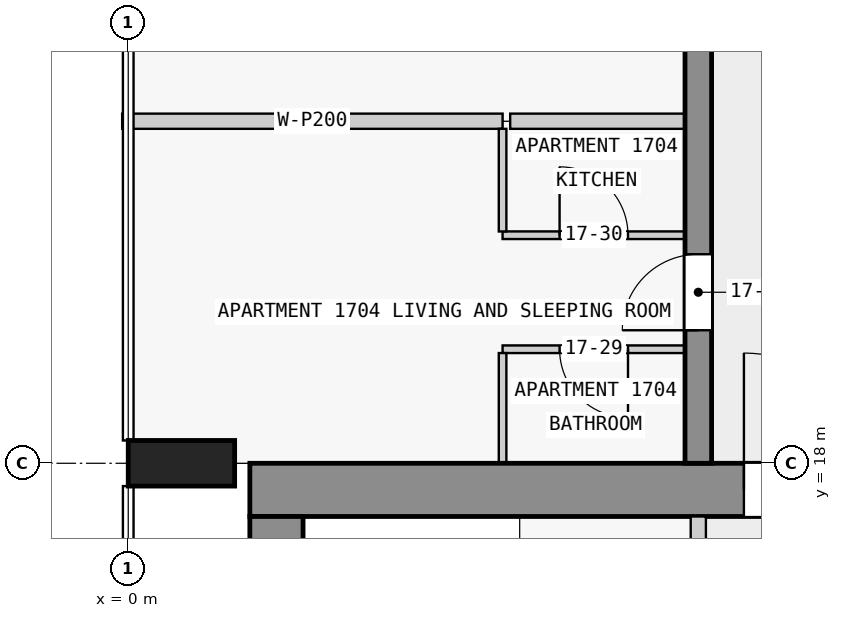
"""IFC4 building model, lengths in metres.
Left out: names, types, materials, properties, quantities, classifications, styles, units other than length and angle.
Written with IfcOpenShell. Run it as: python <this file> out.ifc"""

import sys

from ifc_helpers import new_model, si_unit, direction, frame, frame_2d, origin, origin_2d, place, context, subcontext, project, spatial, rectangle, extrude, element, fill, save


model = new_model("IFC4")
c1 = context("Model", 3, precision=1e-05, world=origin(), true_north=direction((0.0, 1.0)))
c2 = subcontext(c1, "Body", "Model", "MODEL_VIEW")
j1 = project(units=[si_unit("LENGTHUNIT", "METRE"), si_unit("PLANEANGLEUNIT", "RADIAN")], contexts=[c1])
p1 = place(None, origin())
s1 = spatial("IfcSite", under=j1, at=p1, CompositionType="ELEMENT")
p2 = place(p1, origin())
s2 = spatial("IfcBuilding", under=s1, at=p2, CompositionType="ELEMENT")
p3 = place(p2, frame((0.0, 0.0, 68.8)))
s3 = spatial("IfcBuildingStorey", under=s2, at=p3, CompositionType="ELEMENT", Elevation=68.8)
p4 = place(p3, frame((0.7, 18.0, 0.0), z_axis=(0.0, 0.0, 1.0), x_axis=(0.0, 1.0, 0.0)))
e1 = element("IfcColumn", 1, at=p4, inside=s3, PredefinedType="COLUMN", context=c2, shape_type="SweptSolid", body=[
    extrude(rectangle(XDim=0.6, YDim=1.4, at=origin_2d()), origin(), (0.0, 0.0, 1.0), 3.5),
])
p5 = place(p3, frame((1.6, 17.65, 0.0), z_axis=(0.0, 0.0, 1.0), x_axis=(1.0, 0.0, 0.0)))
e2 = element("IfcWall", 2, at=p5, inside=s3, PredefinedType="SHEAR", context=c2, shape_type="SweptSolid", body=[
    extrude(rectangle(XDim=20.9, YDim=0.7, at=frame_2d((10.45, 0.0))), origin(), (0.0, 0.0, 1.0), 3.2),
])
p6 = place(p5, frame((6.5, 0.0, 0.0)))
e3 = element("IfcOpeningElement", 3, at=p6, cuts=e2, PredefinedType="OPENING", context=c2, shape_type="SweptSolid", body=[
    extrude(rectangle(XDim=1.8, YDim=2.1, at=frame_2d((0.9, 1.05))), frame((0.0, 0.36, 0.0), z_axis=(0.0, -1.0, 0.0), x_axis=(1.0, 0.0, 0.0)), (0.0, 0.0, 1.0), 0.72),
])
p7 = place(p3, frame((1.95, 2.5, 0.0), z_axis=(0.0, 0.0, 1.0), x_axis=(0.0, 1.0, 0.0)))
e4 = element("IfcWall", 4, at=p7, inside=s3, PredefinedType="SHEAR", context=c2, shape_type="SweptSolid", body=[
    extrude(rectangle(XDim=14.8, YDim=0.7, at=frame_2d((7.4, 0.0))), origin(), (0.0, 0.0, 1.0), 3.2),
])
p8 = place(p3, frame((7.5, 18.0, 0.0), z_axis=(0.0, 0.0, 1.0), x_axis=(0.0, 1.0, 0.0)))
e5 = element("IfcWall", 5, at=p8, inside=s3, PredefinedType="SHEAR", context=c2, shape_type="SweptSolid", body=[
    extrude(rectangle(XDim=27.0, YDim=0.35, at=frame_2d((13.5, 0.0))), origin(), (0.0, 0.0, 1.0), 3.2),
])
p9 = place(p8, frame((1.75, 0.0, 0.0)))
e6 = element("IfcOpeningElement", 6, at=p9, cuts=e5, PredefinedType="OPENING", context=c2, shape_type="SweptSolid", body=[
    extrude(rectangle(XDim=1.0, YDim=2.1, at=frame_2d((0.5, 1.05))), frame((0.0, 0.185, 0.0), z_axis=(0.0, -1.0, 0.0), x_axis=(1.0, 0.0, 0.0)), (0.0, 0.0, 1.0), 0.37),
])
p10 = place(p8, frame((6.25, 0.0, 0.0)))
e7 = element("IfcOpeningElement", 7, at=p10, cuts=e5, PredefinedType="OPENING", context=c2, shape_type="SweptSolid", body=[
    extrude(rectangle(XDim=1.0, YDim=2.1, at=frame_2d((0.5, 1.05))), frame((0.0, 0.185, 0.0), z_axis=(0.0, -1.0, 0.0), x_axis=(1.0, 0.0, 0.0)), (0.0, 0.0, 1.0), 0.37),
])
p11 = place(p8, frame((10.75, 0.0, 0.0)))
e8 = element("IfcOpeningElement", 8, at=p11, cuts=e5, PredefinedType="OPENING", context=c2, shape_type="SweptSolid", body=[
    extrude(rectangle(XDim=1.0, YDim=2.1, at=frame_2d((0.5, 1.05))), frame((0.0, 0.185, 0.0), z_axis=(0.0, -1.0, 0.0), x_axis=(1.0, 0.0, 0.0)), (0.0, 0.0, 1.0), 0.37),
])
p12 = place(p8, frame((17.55, 0.0, 0.0)))
e9 = element("IfcOpeningElement", 9, at=p12, cuts=e5, PredefinedType="OPENING", context=c2, shape_type="SweptSolid", body=[
    extrude(rectangle(XDim=1.0, YDim=2.1, at=frame_2d((0.5, 1.05))), frame((0.0, 0.185, 0.0), z_axis=(0.0, -1.0, 0.0), x_axis=(1.0, 0.0, 0.0)), (0.0, 0.0, 1.0), 0.37),
])
p13 = place(p8, frame((23.25, 0.0, 0.0)))
e10 = element("IfcOpeningElement", 10, at=p13, cuts=e5, PredefinedType="OPENING", context=c2, shape_type="SweptSolid", body=[
    extrude(rectangle(XDim=0.9, YDim=2.1, at=frame_2d((0.45, 1.05))), frame((0.0, 0.185, 0.0), z_axis=(0.0, -1.0, 0.0), x_axis=(1.0, 0.0, 0.0)), (0.0, 0.0, 1.0), 0.37),
])
p14 = place(p8, frame((25.45, 0.0, 0.0)))
e11 = element("IfcOpeningElement", 11, at=p14, cuts=e5, PredefinedType="OPENING", context=c2, shape_type="SweptSolid", body=[
    extrude(rectangle(XDim=1.0, YDim=2.1, at=frame_2d((0.5, 1.05))), frame((0.0, 0.185, 0.0), z_axis=(0.0, -1.0, 0.0), x_axis=(1.0, 0.0, 0.0)), (0.0, 0.0, 1.0), 0.37),
])
p15 = place(p3, frame((7.5, 10.1, 0.0), z_axis=(0.0, 0.0, 1.0), x_axis=(0.0, 1.0, 0.0)))
e12 = element("IfcWall", 12, at=p15, inside=s3, PredefinedType="PARTITIONING", context=c2, shape_type="SweptSolid", body=[
    extrude(rectangle(XDim=7.2, YDim=0.2, at=frame_2d((3.6, 0.0))), origin(), (0.0, 0.0, 1.0), 3.2),
])
p16 = place(p15, frame((0.75, 0.0, 0.0)))
e13 = element("IfcOpeningElement", 13, at=p16, cuts=e12, PredefinedType="OPENING", context=c2, shape_type="SweptSolid", body=[
    extrude(rectangle(XDim=0.9, YDim=2.1, at=frame_2d((0.45, 1.05))), frame((0.0, 0.11, 0.0), z_axis=(0.0, -1.0, 0.0), x_axis=(1.0, 0.0, 0.0)), (0.0, 0.0, 1.0), 0.22),
])
p17 = place(p15, frame((4.35, 0.0, 0.0)))
e14 = element("IfcOpeningElement", 14, at=p17, cuts=e12, PredefinedType="OPENING", context=c2, shape_type="SweptSolid", body=[
    extrude(rectangle(XDim=0.9, YDim=2.1, at=frame_2d((0.45, 1.05))), frame((0.0, 0.11, 0.0), z_axis=(0.0, -1.0, 0.0), x_axis=(1.0, 0.0, 0.0)), (0.0, 0.0, 1.0), 0.22),
])
p18 = place(p3, frame((7.325, 19.5, 0.0), z_axis=(0.0, 0.0, 1.0), x_axis=(-1.0, 0.0, 0.0)))
e15 = element("IfcWall", 15, at=p18, inside=s3, PredefinedType="PARTITIONING", context=c2, shape_type="SweptSolid", body=[
    extrude(rectangle(XDim=2.4, YDim=0.1, at=frame_2d((1.2, 0.0))), origin(), (0.0, 0.0, 1.0), 3.2),
])
p19 = place(p18, frame((0.75, 0.0, 0.0)))
e16 = element("IfcOpeningElement", 16, at=p19, cuts=e15, PredefinedType="OPENING", context=c2, shape_type="SweptSolid", body=[
    extrude(rectangle(XDim=0.9, YDim=2.1, at=frame_2d((0.45, 1.05))), frame((0.0, 0.06, 0.0), z_axis=(0.0, -1.0, 0.0), x_axis=(1.0, 0.0, 0.0)), (0.0, 0.0, 1.0), 0.12),
])
p20 = place(p3, frame((4.925, 21.0, 0.0), z_axis=(0.0, 0.0, 1.0), x_axis=(1.0, 0.0, 0.0)))
e17 = element("IfcWall", 17, at=p20, inside=s3, PredefinedType="PARTITIONING", context=c2, shape_type="SweptSolid", body=[
    extrude(rectangle(XDim=2.4, YDim=0.1, at=frame_2d((1.2, 0.0))), origin(), (0.0, 0.0, 1.0), 3.2),
])
p21 = place(p20, frame((0.75, 0.0, 0.0)))
e18 = element("IfcOpeningElement", 18, at=p21, cuts=e17, PredefinedType="OPENING", context=c2, shape_type="SweptSolid", body=[
    extrude(rectangle(XDim=0.9, YDim=2.1, at=frame_2d((0.45, 1.05))), frame((0.0, 0.06, 0.0), z_axis=(0.0, -1.0, 0.0), x_axis=(1.0, 0.0, 0.0)), (0.0, 0.0, 1.0), 0.12),
])
p22 = place(p3, frame((7.325, 22.5, 0.0), z_axis=(0.0, 0.0, 1.0), x_axis=(-1.0, 0.0, 0.0)))
e19 = element("IfcWall", 19, at=p22, inside=s3, PredefinedType="PARTITIONING", context=c2, shape_type="SweptSolid", body=[
    extrude(rectangle(XDim=2.3, YDim=0.2, at=frame_2d((1.15, 0.0))), origin(), (0.0, 0.0, 1.0), 3.2),
])
p23 = place(p3, frame((-0.08, 22.5, 0.0), z_axis=(0.0, 0.0, 1.0), x_axis=(1.0, 0.0, 0.0)))
e20 = element("IfcWall", 20, at=p23, inside=s3, PredefinedType="PARTITIONING", context=c2, shape_type="SweptSolid", body=[
    extrude(rectangle(XDim=5.005, YDim=0.2, at=frame_2d((2.502, 0.0))), origin(), (0.0, 0.0, 1.0), 3.2),
])
p24 = place(p3, frame((4.925, 19.45, 0.0), z_axis=(0.0, 0.0, 1.0), x_axis=(0.0, -1.0, 0.0)))
e21 = element("IfcWall", 21, at=p24, inside=s3, PredefinedType="PARTITIONING", context=c2, shape_type="SweptSolid", body=[
    extrude(rectangle(XDim=1.45, YDim=0.1, at=frame_2d((0.725, 0.0))), origin(), (0.0, 0.0, 1.0), 3.2),
])
p25 = place(p3, frame((4.925, 22.4, 0.0), z_axis=(0.0, 0.0, 1.0), x_axis=(0.0, -1.0, 0.0)))
e22 = element("IfcWall", 22, at=p25, inside=s3, PredefinedType="PARTITIONING", context=c2, shape_type="SweptSolid", body=[
    extrude(rectangle(XDim=1.35, YDim=0.1, at=frame_2d((0.675, 0.0))), origin(), (0.0, 0.0, 1.0), 3.2),
])
p26 = place(p6, origin())
e23 = element("IfcDoor", 23, at=p26, inside=s3, OperationType="DOUBLE_DOOR_SINGLE_SWING", PredefinedType="DOOR", context=c2, shape_type="SweptSolid", body=[
    extrude(rectangle(XDim=1.8, YDim=2.1, at=frame_2d((0.9, 1.05))), frame((0.0, 0.025, 0.0), z_axis=(0.0, -1.0, 0.0), x_axis=(1.0, 0.0, 0.0)), (0.0, 0.0, 1.0), 0.05),
])
fill(e3, e23)
p27 = place(p9, origin())
e24 = element("IfcDoor", 24, at=p27, inside=s3, OperationType="SINGLE_SWING_LEFT", PredefinedType="DOOR", context=c2, shape_type="SweptSolid", body=[
    extrude(rectangle(XDim=1.0, YDim=2.1, at=frame_2d((0.5, 1.05))), frame((0.0, 0.025, 0.0), z_axis=(0.0, -1.0, 0.0), x_axis=(1.0, 0.0, 0.0)), (0.0, 0.0, 1.0), 0.05),
])
fill(e6, e24)
p28 = place(p19, origin())
e25 = element("IfcDoor", 25, at=p28, inside=s3, OperationType="SINGLE_SWING_LEFT", PredefinedType="DOOR", context=c2, shape_type="SweptSolid", body=[
    extrude(rectangle(XDim=0.9, YDim=2.1, at=frame_2d((0.45, 1.05))), frame((0.0, 0.025, 0.0), z_axis=(0.0, -1.0, 0.0), x_axis=(1.0, 0.0, 0.0)), (0.0, 0.0, 1.0), 0.05),
])
fill(e16, e25)
p29 = place(p21, origin())
e26 = element("IfcDoor", 26, at=p29, inside=s3, OperationType="SINGLE_SWING_LEFT", PredefinedType="DOOR", context=c2, shape_type="SweptSolid", body=[
    extrude(rectangle(XDim=0.9, YDim=2.1, at=frame_2d((0.45, 1.05))), frame((0.0, 0.025, 0.0), z_axis=(0.0, -1.0, 0.0), x_axis=(1.0, 0.0, 0.0)), (0.0, 0.0, 1.0), 0.05),
])
fill(e18, e26)
save(model, sys.argv[1])
